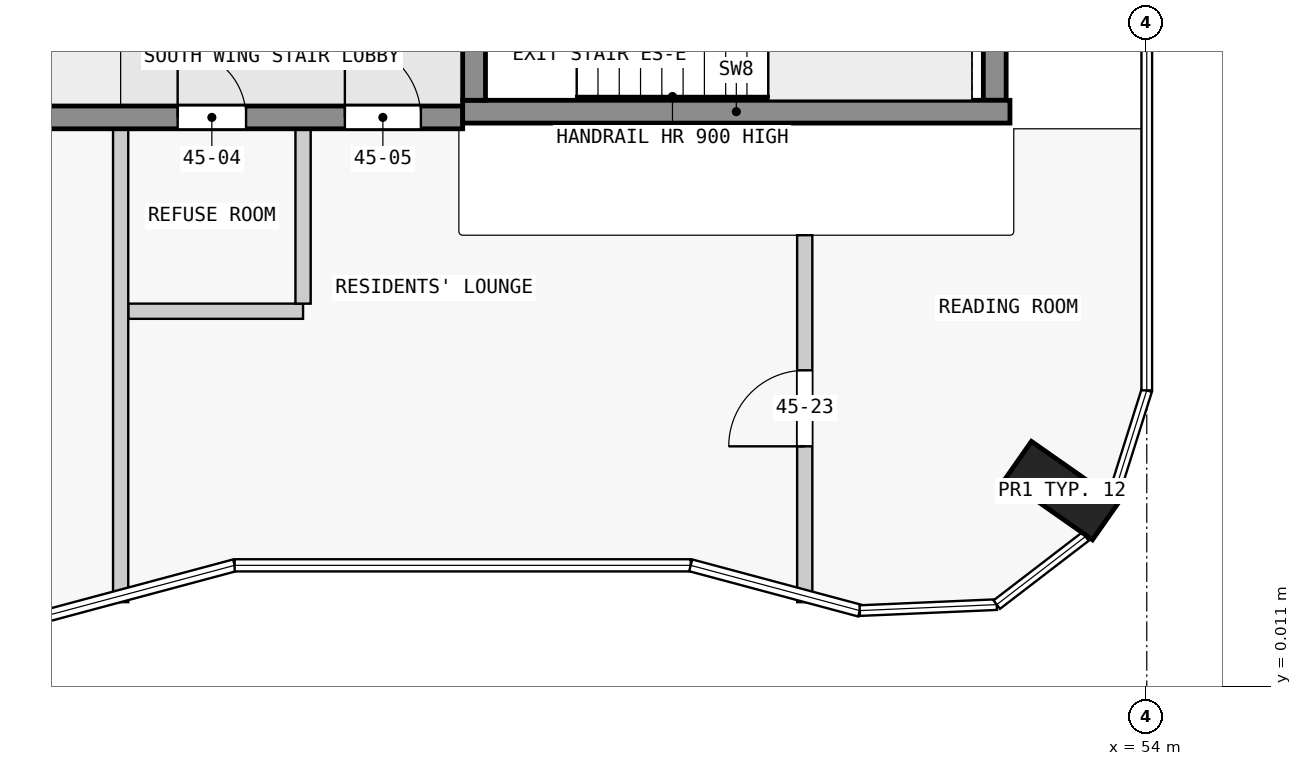
"""IFC4 building model, lengths in metres.
Left out: names, types, materials, properties, quantities, classifications, styles, units other than length and angle.
Written with IfcOpenShell. Run it as: python <this file> out.ifc"""

import sys

from ifc_helpers import new_model, si_unit, direction, frame, frame_2d, origin, origin_2d, place, context, subcontext, project, spatial, rectangle, extrude, element, fill, save


model = new_model("IFC4")
c1 = context("Model", 3, precision=1e-05, world=origin(), true_north=direction((0.0, 1.0)))
c2 = subcontext(c1, "Body", "Model", "MODEL_VIEW")
j1 = project(units=[si_unit("LENGTHUNIT", "METRE"), si_unit("PLANEANGLEUNIT", "RADIAN")], contexts=[c1])
p1 = place(None, origin())
s1 = spatial("IfcSite", under=j1, at=p1, CompositionType="ELEMENT")
p2 = place(p1, origin())
s2 = spatial("IfcBuilding", under=s1, at=p2, CompositionType="ELEMENT")
p3 = place(p2, frame((0.0, 0.0, 174.4)))
s3 = spatial("IfcBuildingStorey", under=s2, at=p3, CompositionType="ELEMENT", Elevation=174.4)
p4 = place(p3, frame((52.884, 2.59, 0.0), z_axis=(0.0, 0.0, 1.0), x_axis=(0.573542637991, 0.819175709117, 0.0)))
e1 = element("IfcColumn", 1, at=p4, inside=s3, PredefinedType="COLUMN", context=c2, shape_type="SweptSolid", body=[
    extrude(rectangle(XDim=0.6, YDim=1.4, at=origin_2d()), origin(), (0.0, 0.0, 1.0), 3.5),
])
p5 = place(p3, frame((45.15, 7.725, 0.0), z_axis=(0.0, 0.0, 1.0), x_axis=(0.0, 1.0, 0.0)))
e2 = element("IfcWall", 2, at=p5, inside=s3, PredefinedType="SHEAR", context=c2, shape_type="SweptSolid", body=[
    extrude(rectangle(XDim=2.55, YDim=0.3, at=frame_2d((1.275, 0.0))), origin(), (0.0, 0.0, 1.0), 3.5),
])
p6 = place(p5, frame((0.725, 0.0, 0.0)))
e3 = element("IfcOpeningElement", 3, at=p6, cuts=e2, PredefinedType="OPENING", context=c2, shape_type="SweptSolid", body=[
    extrude(rectangle(XDim=1.1, YDim=2.1, at=frame_2d((0.55, 1.05))), frame((0.0, 0.16, 0.0), z_axis=(0.0, -1.0, 0.0), x_axis=(1.0, 0.0, 0.0)), (0.0, 0.0, 1.0), 0.32),
])
p7 = place(p3, frame((52.0, 7.725, 0.0), z_axis=(0.0, 0.0, 1.0), x_axis=(0.0, 1.0, 0.0)))
e4 = element("IfcWall", 4, at=p7, inside=s3, PredefinedType="SHEAR", context=c2, shape_type="SweptSolid", body=[
    extrude(rectangle(XDim=2.55, YDim=0.3, at=frame_2d((1.275, 0.0))), origin(), (0.0, 0.0, 1.0), 3.5),
])
p8 = place(p3, frame((45.0, 7.575, 0.0), z_axis=(0.0, 0.0, 1.0), x_axis=(1.0, 0.0, 0.0)))
e5 = element("IfcWall", 5, at=p8, inside=s3, PredefinedType="SHEAR", context=c2, shape_type="SweptSolid", body=[
    extrude(rectangle(XDim=7.2, YDim=0.3, at=frame_2d((3.6, 0.0))), origin(), (0.0, 0.0, 1.0), 3.5),
])
p9 = place(p3, frame((22.5, 7.5, 0.0), z_axis=(0.0, 0.0, 1.0), x_axis=(1.0, 0.0, 0.0)))
e6 = element("IfcWall", 6, at=p9, inside=s3, PredefinedType="SHEAR", context=c2, shape_type="SweptSolid", body=[
    extrude(rectangle(XDim=22.5, YDim=0.3, at=frame_2d((11.25, 0.0))), origin(), (0.0, 0.0, 1.0), 3.25),
])
p10 = place(p9, frame((4.05, 0.0, 0.0)))
e7 = element("IfcOpeningElement", 7, at=p10, cuts=e6, PredefinedType="OPENING", context=c2, shape_type="SweptSolid", body=[
    extrude(rectangle(XDim=1.0, YDim=2.1, at=frame_2d((0.5, 1.05))), frame((0.0, 0.16, 0.0), z_axis=(0.0, -1.0, 0.0), x_axis=(1.0, 0.0, 0.0)), (0.0, 0.0, 1.0), 0.32),
])
p11 = place(p9, frame((10.75, 0.0, 0.0)))
e8 = element("IfcOpeningElement", 8, at=p11, cuts=e6, PredefinedType="OPENING", context=c2, shape_type="SweptSolid", body=[
    extrude(rectangle(XDim=1.0, YDim=2.1, at=frame_2d((0.5, 1.05))), frame((0.0, 0.16, 0.0), z_axis=(0.0, -1.0, 0.0), x_axis=(1.0, 0.0, 0.0)), (0.0, 0.0, 1.0), 0.32),
])
p12 = place(p9, frame((15.35, 0.0, 0.0)))
e9 = element("IfcOpeningElement", 9, at=p12, cuts=e6, PredefinedType="OPENING", context=c2, shape_type="SweptSolid", body=[
    extrude(rectangle(XDim=0.9, YDim=2.1, at=frame_2d((0.45, 1.05))), frame((0.0, 0.16, 0.0), z_axis=(0.0, -1.0, 0.0), x_axis=(1.0, 0.0, 0.0)), (0.0, 0.0, 1.0), 0.32),
])
p13 = place(p9, frame((18.75, 0.0, 0.0)))
e10 = element("IfcOpeningElement", 10, at=p13, cuts=e6, PredefinedType="OPENING", context=c2, shape_type="SweptSolid", body=[
    extrude(rectangle(XDim=0.9, YDim=2.1, at=frame_2d((0.45, 1.05))), frame((0.0, 0.16, 0.0), z_axis=(0.0, -1.0, 0.0), x_axis=(1.0, 0.0, 0.0)), (0.0, 0.0, 1.0), 0.32),
])
p14 = place(p9, frame((20.95, 0.0, 0.0)))
e11 = element("IfcOpeningElement", 11, at=p14, cuts=e6, PredefinedType="OPENING", context=c2, shape_type="SweptSolid", body=[
    extrude(rectangle(XDim=1.0, YDim=2.1, at=frame_2d((0.5, 1.05))), frame((0.0, 0.16, 0.0), z_axis=(0.0, -1.0, 0.0), x_axis=(1.0, 0.0, 0.0)), (0.0, 0.0, 1.0), 0.32),
])
p15 = place(p3, frame((40.6, 4.95, 0.0), z_axis=(0.0, 0.0, 1.0), x_axis=(1.0, 0.0, 0.0)))
e12 = element("IfcWall", 12, at=p15, inside=s3, PredefinedType="PARTITIONING", context=c2, shape_type="SweptSolid", body=[
    extrude(rectangle(XDim=2.3, YDim=0.2, at=frame_2d((1.15, 0.0))), origin(), (0.0, 0.0, 1.0), 3.25),
])
p16 = place(p3, frame((40.5, 1.122, 0.0), z_axis=(0.0, 0.0, 1.0), x_axis=(0.0, 1.0, 0.0)))
e13 = element("IfcWall", 13, at=p16, inside=s3, PredefinedType="PARTITIONING", context=c2, shape_type="SweptSolid", body=[
    extrude(rectangle(XDim=6.228, YDim=0.2, at=frame_2d((3.114, 0.0))), origin(), (0.0, 0.0, 1.0), 3.25),
])
p17 = place(p3, frame((42.9, 5.05, 0.0), z_axis=(0.0, 0.0, 1.0), x_axis=(0.0, 1.0, 0.0)))
e14 = element("IfcWall", 14, at=p17, inside=s3, PredefinedType="PARTITIONING", context=c2, shape_type="SweptSolid", body=[
    extrude(rectangle(XDim=2.3, YDim=0.2, at=frame_2d((1.15, 0.0))), origin(), (0.0, 0.0, 1.0), 3.25),
])
p18 = place(p3, frame((49.5, 1.122, 0.0), z_axis=(0.0, 0.0, 1.0), x_axis=(0.0, 1.0, 0.0)))
e15 = element("IfcWall", 15, at=p18, inside=s3, PredefinedType="PARTITIONING", context=c2, shape_type="SweptSolid", body=[
    extrude(rectangle(XDim=4.828, YDim=0.2, at=frame_2d((2.414, 0.0))), origin(), (0.0, 0.0, 1.0), 3.25),
])
p19 = place(p18, frame((2.05, 0.0, 0.0)))
e16 = element("IfcOpeningElement", 16, at=p19, cuts=e15, PredefinedType="OPENING", context=c2, shape_type="SweptSolid", body=[
    extrude(rectangle(XDim=1.0, YDim=2.1, at=frame_2d((0.5, 1.05))), frame((0.0, 0.11, 0.0), z_axis=(0.0, -1.0, 0.0), x_axis=(1.0, 0.0, 0.0)), (0.0, 0.0, 1.0), 0.22),
])
p20 = place(p13, origin())
e17 = element("IfcDoor", 17, at=p20, inside=s3, OperationType="SINGLE_SWING_RIGHT", PredefinedType="DOOR", context=c2, shape_type="SweptSolid", body=[
    extrude(rectangle(XDim=0.9, YDim=2.1, at=frame_2d((0.45, 1.05))), frame((0.0, 0.025, 0.0), z_axis=(0.0, -1.0, 0.0), x_axis=(1.0, 0.0, 0.0)), (0.0, 0.0, 1.0), 0.05),
])
fill(e10, e17)
p21 = place(p14, origin())
e18 = element("IfcDoor", 18, at=p21, inside=s3, OperationType="SINGLE_SWING_RIGHT", PredefinedType="DOOR", context=c2, shape_type="SweptSolid", body=[
    extrude(rectangle(XDim=1.0, YDim=2.1, at=frame_2d((0.5, 1.05))), frame((0.0, 0.025, 0.0), z_axis=(0.0, -1.0, 0.0), x_axis=(1.0, 0.0, 0.0)), (0.0, 0.0, 1.0), 0.05),
])
fill(e11, e18)
p22 = place(p19, origin())
e19 = element("IfcDoor", 19, at=p22, inside=s3, OperationType="SINGLE_SWING_RIGHT", PredefinedType="DOOR", context=c2, shape_type="SweptSolid", body=[
    extrude(rectangle(XDim=1.0, YDim=2.1, at=frame_2d((0.5, 1.05))), frame((0.0, 0.025, 0.0), z_axis=(0.0, -1.0, 0.0), x_axis=(1.0, 0.0, 0.0)), (0.0, 0.0, 1.0), 0.05),
])
fill(e16, e19)
save(model, sys.argv[1])
